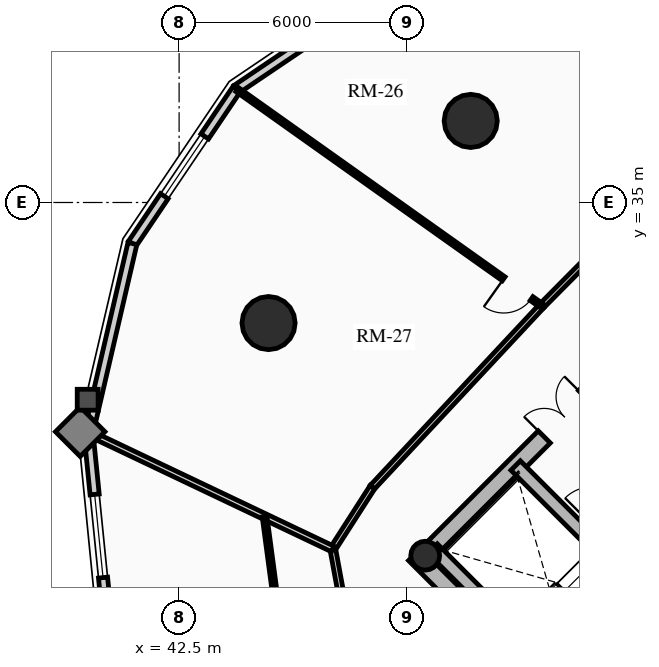
"""IFC4 building model, lengths in metres.
Left out: names, types, materials, properties, quantities, classifications, styles, units other than length and angle.
Written with IfcOpenShell. Run it as: python <this file> out.ifc"""

import sys

from ifc_helpers import new_model, si_unit, direction, frame, frame_2d, origin, origin_2d, place, context, subcontext, project, spatial, rectangle, circle, hollow_circle, extrude, source, transform, mapped, element, fill, save


model = new_model("IFC4")
c1 = context("Model", 3, precision=1e-05, world=origin(), true_north=direction((0.0, 1.0)))
c2 = subcontext(c1, "Body", "Model", "MODEL_VIEW")
j1 = project(units=[si_unit("LENGTHUNIT", "METRE"), si_unit("PLANEANGLEUNIT", "RADIAN")], contexts=[c1])
p1 = place(None, origin())
s1 = spatial("IfcSite", under=j1, at=p1, CompositionType="ELEMENT")
p2 = place(p1, origin())
s2 = spatial("IfcBuilding", under=s1, at=p2, CompositionType="ELEMENT")
p3 = place(p2, frame((0.0, 0.0, 119.62)))
s3 = spatial("IfcBuildingStorey", under=s2, at=p3, CompositionType="ELEMENT", Elevation=119.62)
p4 = place(p3, frame((58.737, 15.697, 0.0), z_axis=(0.0, 0.0, 1.0), x_axis=(-0.707106781187, 0.707106781187, 0.0)))
e1 = element("IfcWall", 1, at=p4, inside=s3, PredefinedType="SHEAR", context=c2, shape_type="SweptSolid", body=[
    extrude(rectangle(XDim=14.2, YDim=0.45, at=frame_2d((7.1, 0.0))), origin(), (0.0, 0.0, 1.0), 2.91),
])
p5 = place(p3, frame((48.856, 25.578, 0.0), z_axis=(0.0, 0.0, 1.0), x_axis=(0.707106781187, 0.707106781187, 0.0)))
e2 = element("IfcWall", 2, at=p5, inside=s3, PredefinedType="SHEAR", context=c2, shape_type="SweptSolid", body=[
    extrude(rectangle(XDim=10.7, YDim=0.45, at=frame_2d((5.35, 0.0))), origin(), (0.0, 0.0, 1.0), 2.91),
])
m1 = source(origin(), c2, "Body", "SweptSolid", [
    extrude(rectangle(XDim=1.5, YDim=2.02, at=frame_2d((0.75, 1.01))), frame((0.0, 0.235, 0.0), z_axis=(0.0, -1.0, 0.0), x_axis=(1.0, 0.0, 0.0)), (0.0, 0.0, 1.0), 0.47),
])
p6 = place(p5, frame((4.6, 0.0, 0.0)))
e3 = element("IfcOpeningElement", 3, at=p6, cuts=e2, PredefinedType="OPENING", context=c2, shape_type="MappedRepresentation", body=[
    mapped(m1, transform((0.0, 0.0, 0.0), x_axis=(1.0, 0.0, 0.0), y_axis=(0.0, 1.0, 0.0), z_axis=(0.0, 0.0, 1.0), scale=1.0)),
])
p7 = place(p3, frame((61.078, 18.355, 0.0), z_axis=(0.0, 0.0, 1.0), x_axis=(-0.707106781187, 0.707106781187, 0.0)))
e4 = element("IfcWall", 4, at=p7, inside=s3, PredefinedType="SHEAR", context=c2, shape_type="SweptSolid", body=[
    extrude(rectangle(XDim=13.75, YDim=0.35, at=frame_2d((6.875, 0.0))), origin(), (0.0, 0.0, 1.0), 2.91),
])
m2 = source(origin(), c2, "Body", "SweptSolid", [
    extrude(rectangle(XDim=1.1, YDim=2.015, at=frame_2d((0.55, 1.007))), frame((0.0, 0.185, 0.0), z_axis=(0.0, -1.0, 0.0), x_axis=(1.0, 0.0, 0.0)), (0.0, 0.0, 1.0), 0.37),
])
p8 = place(p7, frame((4.875, 0.0, 0.0)))
e5 = element("IfcOpeningElement", 5, at=p8, cuts=e4, PredefinedType="OPENING", context=c2, shape_type="MappedRepresentation", body=[
    mapped(m2, transform((0.0, 0.0, 0.0), x_axis=(1.0, 0.0, 0.0), y_axis=(0.0, 1.0, 0.0), z_axis=(0.0, 0.0, 1.0), scale=1.0)),
])
m3 = source(origin(), c2, "Body", "SweptSolid", [
    extrude(rectangle(XDim=1.15, YDim=2.02, at=frame_2d((0.575, 1.01))), frame((0.0, 0.185, 0.0), z_axis=(0.0, -1.0, 0.0), x_axis=(1.0, 0.0, 0.0)), (0.0, 0.0, 1.0), 0.37),
])
p9 = place(p7, frame((7.295, 0.0, 0.0)))
e6 = element("IfcOpeningElement", 6, at=p9, cuts=e4, PredefinedType="OPENING", context=c2, shape_type="MappedRepresentation", body=[
    mapped(m3, transform((0.0, 0.0, 0.0), x_axis=(1.0, 0.0, 0.0), y_axis=(0.0, 1.0, 0.0), z_axis=(0.0, 0.0, 1.0), scale=1.0)),
])
p10 = place(p3, frame((53.922, 21.141, 0.0), z_axis=(0.0, 0.0, 1.0), x_axis=(-0.707088616009, 0.707124945897, 0.0)))
e7 = element("IfcWall", 7, at=p10, inside=s3, PredefinedType="SHEAR", context=c2, shape_type="SweptSolid", body=[
    extrude(rectangle(XDim=6.72, YDim=0.35, at=frame_2d((3.36, 0.0))), origin(), (0.0, 0.0, 1.0), 2.91),
])
p11 = place(p3, frame((48.976, 25.706, 0.0), z_axis=(0.0, 0.0, 1.0), x_axis=(0.707106781187, 0.707106781187, 0.0)))
e8 = element("IfcColumn", 8, at=p11, inside=s3, PredefinedType="COLUMN", context=c2, shape_type="SweptSolid", body=[
    extrude(hollow_circle(Radius=0.38, WallThickness=0.032, at=origin_2d()), origin(), (0.0, 0.0, 1.0), 2.91),
])
for number, where, z_axis, x_axis in (
    (9, (50.173, 37.146, 0.0), (0.0, 0.0, 1.0), (1.0, 0.0, 0.0)),
    (10, (44.854, 31.827, 0.0), (0.0, 0.0, 1.0), (1.0, 0.0, 0.0)),
):
    element("IfcColumn", number, at=place(p3, frame(where, z_axis=z_axis, x_axis=x_axis)), inside=s3, PredefinedType="USERDEFINED", context=c2, shape_type="SweptSolid", body=[
        extrude(circle(Radius=0.7, at=origin_2d()), origin(), (0.0, 0.0, 1.0), 2.91),
    ])
p12 = place(p3, frame((44.015, 37.985, 0.0), z_axis=(0.0, 0.0, 1.0), x_axis=(0.828781148131, 0.559572880421, 0.0)))
e11 = element("IfcWall", 11, at=p12, inside=s3, PredefinedType="SOLIDWALL", context=c2, shape_type="SweptSolid", body=[
    extrude(rectangle(XDim=4.905, YDim=0.24, at=frame_2d((2.452, 0.0))), origin(), (0.0, 0.0, 1.0), 2.179),
])
p13 = place(p3, frame((41.271, 33.92, 0.0), z_axis=(0.0, 0.0, 1.0), x_axis=(0.559572880421, 0.828781148131, 0.0)))
e12 = element("IfcWall", 12, at=p13, inside=s3, PredefinedType="SOLIDWALL", context=c2, shape_type="SweptSolid", body=[
    extrude(rectangle(XDim=4.905, YDim=0.24, at=frame_2d((2.452, 0.0))), origin(), (0.0, 0.0, 1.0), 2.179),
])
m4 = source(origin(), c2, "Body", "SweptSolid", [
    extrude(rectangle(XDim=1.9, YDim=1.35, at=frame_2d((0.95, 0.675))), frame((0.0, 0.13, 0.0), z_axis=(0.0, -1.0, 0.0), x_axis=(1.0, 0.0, 0.0)), (0.0, 0.0, 1.0), 0.26),
])
p14 = place(p13, frame((1.502, 0.0, 0.65)))
e13 = element("IfcOpeningElement", 13, at=p14, cuts=e12, PredefinedType="OPENING", context=c2, shape_type="MappedRepresentation", body=[
    mapped(m4, transform((0.0, 0.0, 0.0), x_axis=(1.0, 0.0, 0.0), y_axis=(0.0, 1.0, 0.0), z_axis=(0.0, 0.0, 1.0), scale=1.0)),
])
p15 = place(p3, frame((40.115, 28.933, 0.0), z_axis=(0.0, 0.0, 1.0), x_axis=(0.225834725257, 0.974165631126, 0.0)))
e14 = element("IfcWall", 14, at=p15, inside=s3, PredefinedType="SOLIDWALL", context=c2, shape_type="SweptSolid", body=[
    extrude(rectangle(XDim=5.119, YDim=0.24, at=frame_2d((2.56, 0.0))), origin(), (0.0, 0.0, 1.0), 2.179),
])
p16 = place(p3, frame((40.661, 23.513, 0.0), z_axis=(0.0, 0.0, 1.0), x_axis=(-0.10015591906, 0.994971754311, 0.0)))
e15 = element("IfcWall", 15, at=p16, inside=s3, PredefinedType="SOLIDWALL", context=c2, shape_type="SweptSolid", body=[
    extrude(rectangle(XDim=5.448, YDim=0.24, at=frame_2d((2.724, 0.0))), origin(), (0.0, 0.0, 1.0), 2.179),
])
m5 = source(origin(), c2, "Body", "SweptSolid", [
    extrude(rectangle(XDim=2.2, YDim=1.35, at=frame_2d((1.1, 0.675))), frame((0.0, 0.13, 0.0), z_axis=(0.0, -1.0, 0.0), x_axis=(1.0, 0.0, 0.0)), (0.0, 0.0, 1.0), 0.26),
])
p17 = place(p16, frame((1.624, 0.0, 0.65)))
e16 = element("IfcOpeningElement", 16, at=p17, cuts=e15, PredefinedType="OPENING", context=c2, shape_type="MappedRepresentation", body=[
    mapped(m5, transform((0.0, 0.0, 0.0), x_axis=(1.0, 0.0, 0.0), y_axis=(0.0, 1.0, 0.0), z_axis=(0.0, 0.0, 1.0), scale=1.0)),
])
p18 = place(p3, frame((54.427, 34.683, 0.0), z_axis=(0.0, 0.0, 1.0), x_axis=(-0.704178989986, -0.710022499687, 0.0)))
e17 = element("IfcWall", 17, at=p18, inside=s3, PredefinedType="PARTITIONING", context=c2, shape_type="SweptSolid", body=[
    extrude(rectangle(XDim=3.384, YDim=0.15, at=frame_2d((1.692, 0.0))), origin(), (0.0, 0.0, 1.0), 2.225),
])
p19 = place(p3, frame((52.043, 32.28, 0.0), z_axis=(0.0, 0.0, 1.0), x_axis=(-0.682606081633, -0.730786519661, 0.0)))
e18 = element("IfcWall", 18, at=p19, inside=s3, PredefinedType="PARTITIONING", context=c2, shape_type="SweptSolid", body=[
    extrude(rectangle(XDim=6.527, YDim=0.15, at=frame_2d((3.263, 0.0))), origin(), (0.0, 0.0, 1.0), 2.225),
])
p20 = place(p3, frame((47.588, 27.51, 0.0), z_axis=(0.0, 0.0, 1.0), x_axis=(-0.540202619347, -0.841534984449, 0.0)))
e19 = element("IfcWall", 19, at=p20, inside=s3, PredefinedType="PARTITIONING", context=c2, shape_type="SweptSolid", body=[
    extrude(rectangle(XDim=1.935, YDim=0.15, at=frame_2d((0.967, 0.0))), origin(), (0.0, 0.0, 1.0), 2.225),
])
p21 = place(p3, frame((46.543, 25.882, 0.0), z_axis=(0.0, 0.0, 1.0), x_axis=(0.181153502579, -0.983454832976, 0.0)))
e20 = element("IfcWall", 20, at=p21, inside=s3, PredefinedType="PARTITIONING", context=c2, shape_type="SweptSolid", body=[
    extrude(rectangle(XDim=1.392, YDim=0.15, at=frame_2d((0.696, 0.0))), origin(), (0.0, 0.0, 1.0), 2.225),
])
p22 = place(p3, frame((55.984, 35.035, 0.0), z_axis=(0.0, 0.0, 1.0), x_axis=(-0.392438685048, 0.919778168081, 0.0)))
e21 = element("IfcWall", 21, at=p22, inside=s3, PredefinedType="PARTITIONING", context=c2, shape_type="SweptSolid", body=[
    extrude(rectangle(XDim=7.426, YDim=0.16, at=frame_2d((3.713, 0.0))), origin(), (0.0, 0.0, 1.0), 2.179),
])
p23 = place(p3, frame((46.543, 25.882, 0.0), z_axis=(0.0, 0.0, 1.0), x_axis=(-0.903054383171, 0.429526228576, 0.0)))
e22 = element("IfcWall", 22, at=p23, inside=s3, PredefinedType="PARTITIONING", context=c2, shape_type="SweptSolid", body=[
    extrude(rectangle(XDim=7.096, YDim=0.16, at=frame_2d((3.548, 0.0))), origin(), (0.0, 0.0, 1.0), 2.179),
])
p24 = place(p3, frame((52.043, 32.28, 0.0), z_axis=(0.0, 0.0, 1.0), x_axis=(-0.81534487613, 0.578975589268, 0.0)))
e23 = element("IfcWall", 23, at=p24, inside=s3, PredefinedType="PARTITIONING", context=c2, shape_type="SweptSolid", body=[
    extrude(rectangle(XDim=9.829, YDim=0.125, at=frame_2d((4.915, 0.0))), origin(), (0.0, 0.0, 1.0), 2.179),
])
m6 = source(origin(), c2, "Body", "SweptSolid", [
    extrude(rectangle(XDim=0.9, YDim=2.005, at=frame_2d((0.45, 1.002))), frame((0.0, 0.073, 0.0), z_axis=(0.0, -1.0, 0.0), x_axis=(1.0, 0.0, 0.0)), (0.0, 0.0, 1.0), 0.145),
])
p25 = place(p24, frame((0.33, 0.0, 0.0)))
e24 = element("IfcOpeningElement", 24, at=p25, cuts=e23, PredefinedType="OPENING", context=c2, shape_type="MappedRepresentation", body=[
    mapped(m6, transform((0.0, 0.0, 0.0), x_axis=(1.0, 0.0, 0.0), y_axis=(0.0, 1.0, 0.0), z_axis=(0.0, 0.0, 1.0), scale=1.0)),
])
p26 = place(p3, frame((44.749, 26.736, 0.0), z_axis=(0.0, 0.0, 1.0), x_axis=(0.132518524874, -0.991180528746, 0.0)))
e25 = element("IfcWall", 25, at=p26, inside=s3, PredefinedType="PARTITIONING", context=c2, shape_type="SweptSolid", body=[
    extrude(rectangle(XDim=2.524, YDim=0.125, at=frame_2d((1.262, 0.0))), origin(), (0.0, 0.0, 1.0), 2.179),
])
m7 = source(origin(), c2, "Body", "SweptSolid", [
    extrude(rectangle(XDim=1.9, YDim=1.35, at=frame_2d((0.95, 0.675))), frame((0.0, 0.03, 0.0), z_axis=(0.0, -1.0, 0.0), x_axis=(1.0, 0.0, 0.0)), (0.0, 0.0, 1.0), 0.06),
])
p27 = place(p14, origin())
e26 = element("IfcWindow", 26, at=p27, inside=s3, PartitioningType="DOUBLE_PANEL_VERTICAL", PredefinedType="WINDOW", context=c2, shape_type="MappedRepresentation", body=[
    mapped(m7, transform((0.0, 0.0, 0.0), x_axis=(1.0, 0.0, 0.0), y_axis=(0.0, 1.0, 0.0), z_axis=(0.0, 0.0, 1.0), scale=1.0)),
])
fill(e13, e26)
m8 = source(origin(), c2, "Body", "SweptSolid", [
    extrude(rectangle(XDim=2.2, YDim=1.35, at=frame_2d((1.1, 0.675))), frame((0.0, 0.03, 0.0), z_axis=(0.0, -1.0, 0.0), x_axis=(1.0, 0.0, 0.0)), (0.0, 0.0, 1.0), 0.06),
])
p28 = place(p17, origin())
e27 = element("IfcWindow", 27, at=p28, inside=s3, PartitioningType="DOUBLE_PANEL_VERTICAL", PredefinedType="WINDOW", context=c2, shape_type="MappedRepresentation", body=[
    mapped(m8, transform((0.0, 0.0, 0.0), x_axis=(1.0, 0.0, 0.0), y_axis=(0.0, 1.0, 0.0), z_axis=(0.0, 0.0, 1.0), scale=1.0)),
])
fill(e16, e27)
m9 = source(origin(), c2, "Body", "SweptSolid", [
    extrude(rectangle(XDim=1.5, YDim=2.02, at=frame_2d((0.75, 1.01))), frame((0.0, 0.025, 0.0), z_axis=(0.0, -1.0, 0.0), x_axis=(1.0, 0.0, 0.0)), (0.0, 0.0, 1.0), 0.05),
])
p29 = place(p6, origin())
e28 = element("IfcDoor", 28, at=p29, inside=s3, OperationType="DOUBLE_DOOR_SINGLE_SWING", PredefinedType="DOOR", context=c2, shape_type="MappedRepresentation", body=[
    mapped(m9, transform((0.0, 0.0, 0.0), x_axis=(1.0, 0.0, 0.0), y_axis=(0.0, 1.0, 0.0), z_axis=(0.0, 0.0, 1.0), scale=1.0)),
])
fill(e3, e28)
m10 = source(origin(), c2, "Body", "SweptSolid", [
    extrude(rectangle(XDim=0.9, YDim=2.005, at=frame_2d((0.45, 1.002))), frame((0.0, 0.025, 0.0), z_axis=(0.0, -1.0, 0.0), x_axis=(1.0, 0.0, 0.0)), (0.0, 0.0, 1.0), 0.05),
])
p30 = place(p25, origin())
e29 = element("IfcDoor", 29, at=p30, inside=s3, OperationType="SINGLE_SWING_RIGHT", PredefinedType="DOOR", context=c2, shape_type="MappedRepresentation", body=[
    mapped(m10, transform((0.0, 0.0, 0.0), x_axis=(1.0, 0.0, 0.0), y_axis=(0.0, 1.0, 0.0), z_axis=(0.0, 0.0, 1.0), scale=1.0)),
])
fill(e24, e29)
save(model, sys.argv[1])
